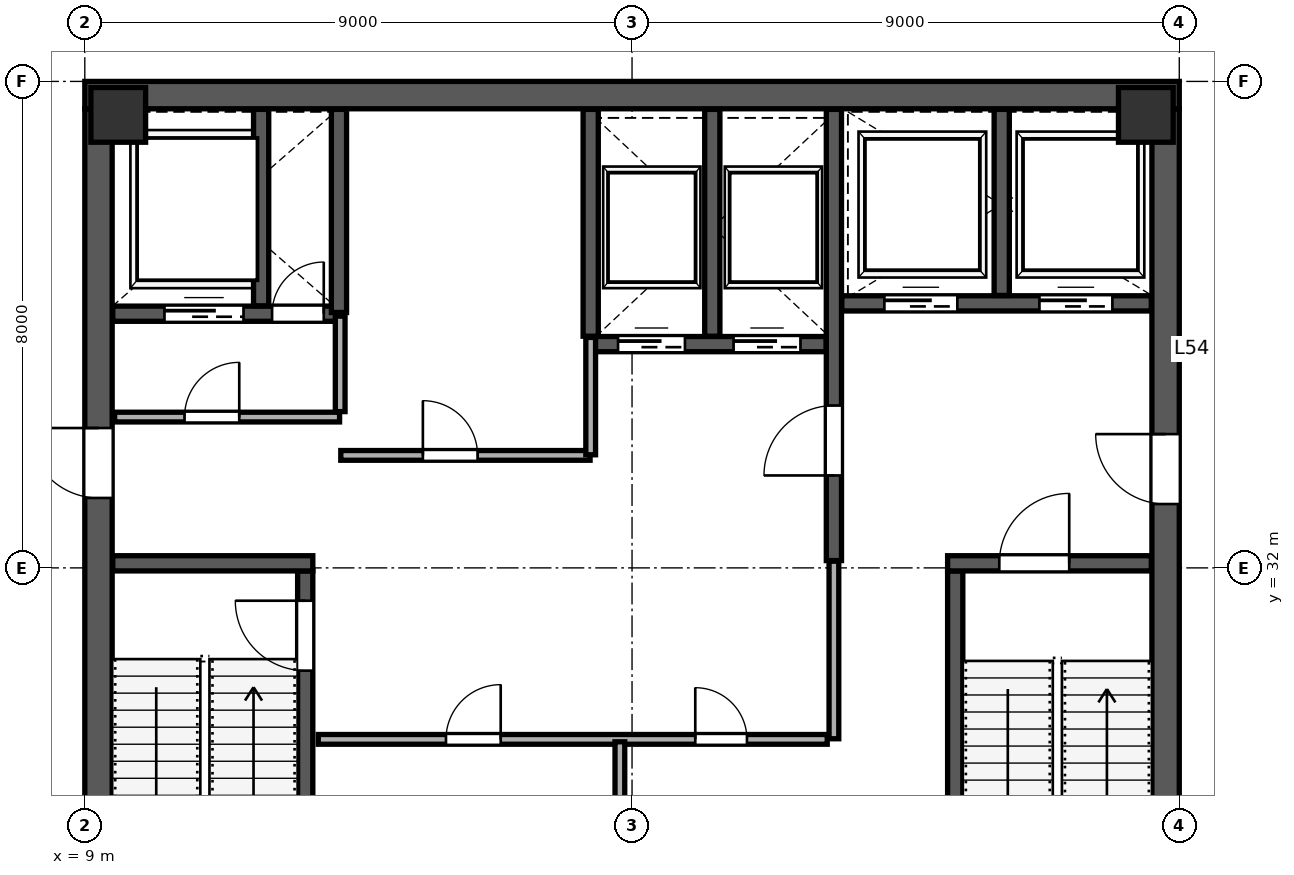
"""IFC4 building model, lengths in metres.
Left out: names, types, materials, properties, quantities, classifications, styles, units other than length and angle.
Written with IfcOpenShell. Run it as: python <this file> out.ifc"""

import sys

from ifc_helpers import new_model, si_unit, direction, frame, frame_2d, origin, origin_2d, place, context, subcontext, project, spatial, rectangle, extrude, source, transform, mapped, element, fill, save


model = new_model("IFC4")
c1 = context("Model", 3, precision=1e-05, world=origin(), true_north=direction((0.0, 1.0)))
c2 = subcontext(c1, "Body", "Model", "MODEL_VIEW")
j1 = project(units=[si_unit("LENGTHUNIT", "METRE"), si_unit("PLANEANGLEUNIT", "RADIAN")], contexts=[c1])
p1 = place(None, origin())
s1 = spatial("IfcSite", under=j1, at=p1, CompositionType="ELEMENT")
p2 = place(p1, origin())
s2 = spatial("IfcBuilding", under=s1, at=p2, CompositionType="ELEMENT")
p3 = place(p2, frame((0.0, 0.0, 241.6)))
s3 = spatial("IfcBuildingStorey", under=s2, at=p3, CompositionType="ELEMENT", Elevation=241.6)
m1 = source(origin(), c2, "Body", "SweptSolid", [
    extrude(rectangle(XDim=0.9, YDim=0.9, at=origin_2d()), origin(), (0.0, 0.0, 1.0), 4.198),
])
for number, where, z_axis, x_axis in (
    (1, (9.55, 39.45, 0.001), (0.0, 0.0, 1.0), (1.0, 0.0, 0.0)),
    (2, (26.45, 39.45, 0.001), (0.0, 0.0, 1.0), (1.0, 0.0, 0.0)),
):
    element("IfcColumn", number, at=place(p3, frame(where, z_axis=z_axis, x_axis=x_axis)), inside=s3, PredefinedType="COLUMN", context=c2, shape_type="MappedRepresentation", body=[
        mapped(m1, transform((0.0, 0.0, 0.0), scale=1.0)),
    ])
p4 = place(p3, frame((9.225, 24.45, 0.0), z_axis=(0.0, 0.0, 1.0), x_axis=(0.0, 1.0, 0.0)))
e3 = element("IfcWall", 3, at=p4, inside=s3, PredefinedType="SHEAR", context=c2, shape_type="SweptSolid", body=[
    extrude(rectangle(XDim=15.1, YDim=0.45, at=frame_2d((7.55, 0.0))), origin(), (0.0, 0.0, 1.0), 3.96),
])
p5 = place(p4, frame((8.7, 0.0, 0.0)))
e4 = element("IfcOpeningElement", 4, at=p5, cuts=e3, PredefinedType="OPENING", context=c2, shape_type="SweptSolid", body=[
    extrude(rectangle(XDim=1.15, YDim=2.2, at=frame_2d((0.575, 1.1))), frame((0.0, 0.235, 0.0), z_axis=(0.0, -1.0, 0.0), x_axis=(1.0, 0.0, 0.0)), (0.0, 0.0, 1.0), 0.47),
])
p6 = place(p3, frame((26.775, 24.45, 0.0), z_axis=(0.0, 0.0, 1.0), x_axis=(0.0, 1.0, 0.0)))
e5 = element("IfcWall", 5, at=p6, inside=s3, PredefinedType="SHEAR", context=c2, shape_type="SweptSolid", body=[
    extrude(rectangle(XDim=15.1, YDim=0.45, at=frame_2d((7.55, 0.0))), origin(), (0.0, 0.0, 1.0), 3.96),
])
p7 = place(p6, frame((8.6, 0.0, 0.0)))
e6 = element("IfcOpeningElement", 6, at=p7, cuts=e5, PredefinedType="OPENING", context=c2, shape_type="SweptSolid", body=[
    extrude(rectangle(XDim=1.15, YDim=2.2, at=frame_2d((0.575, 1.1))), frame((0.0, 0.235, 0.0), z_axis=(0.0, -1.0, 0.0), x_axis=(1.0, 0.0, 0.0)), (0.0, 0.0, 1.0), 0.47),
])
p8 = place(p3, frame((9.0, 39.775, 0.0), z_axis=(0.0, 0.0, 1.0), x_axis=(1.0, 0.0, 0.0)))
e7 = element("IfcWall", 7, at=p8, inside=s3, PredefinedType="SHEAR", context=c2, shape_type="SweptSolid", body=[
    extrude(rectangle(XDim=18.0, YDim=0.45, at=frame_2d((9.0, 0.0))), origin(), (0.0, 0.0, 1.0), 3.96),
])
p9 = place(p3, frame((12.625, 24.46, 0.0), z_axis=(0.0, 0.0, 1.0), x_axis=(0.0, 1.0, 0.0)))
e8 = element("IfcWall", 8, at=p9, inside=s3, PredefinedType="SHEAR", context=c2, shape_type="SweptSolid", body=[
    extrude(rectangle(XDim=7.49, YDim=0.25, at=frame_2d((3.745, 0.0))), origin(), (0.0, 0.0, 1.0), 3.96),
])
p10 = place(p9, frame((5.85, 0.0, 0.0)))
e9 = element("IfcOpeningElement", 9, at=p10, cuts=e8, PredefinedType="OPENING", context=c2, shape_type="SweptSolid", body=[
    extrude(rectangle(XDim=1.15, YDim=2.2, at=frame_2d((0.575, 1.1))), frame((0.0, 0.135, 0.0), z_axis=(0.0, -1.0, 0.0), x_axis=(1.0, 0.0, 0.0)), (0.0, 0.0, 1.0), 0.27),
])
p11 = place(p3, frame((9.46, 32.075, 0.0), z_axis=(0.0, 0.0, 1.0), x_axis=(1.0, 0.0, 0.0)))
e10 = element("IfcWall", 10, at=p11, inside=s3, PredefinedType="SHEAR", context=c2, shape_type="SweptSolid", body=[
    extrude(rectangle(XDim=3.29, YDim=0.25, at=frame_2d((1.645, 0.0))), origin(), (0.0, 0.0, 1.0), 3.96),
])
p12 = place(p3, frame((23.315, 24.46, 0.0), z_axis=(0.0, 0.0, 1.0), x_axis=(0.0, 1.0, 0.0)))
e11 = element("IfcWall", 11, at=p12, inside=s3, PredefinedType="SHEAR", context=c2, shape_type="SweptSolid", body=[
    extrude(rectangle(XDim=7.49, YDim=0.25, at=frame_2d((3.745, 0.0))), origin(), (0.0, 0.0, 1.0), 3.96),
])
p13 = place(p3, frame((23.19, 32.075, 0.0), z_axis=(0.0, 0.0, 1.0), x_axis=(1.0, 0.0, 0.0)))
e12 = element("IfcWall", 12, at=p13, inside=s3, PredefinedType="SHEAR", context=c2, shape_type="SweptSolid", body=[
    extrude(rectangle(XDim=3.35, YDim=0.25, at=frame_2d((1.675, 0.0))), origin(), (0.0, 0.0, 1.0), 3.96),
])
p14 = place(p13, frame((0.85, 0.0, 0.0)))
e13 = element("IfcOpeningElement", 13, at=p14, cuts=e12, PredefinedType="OPENING", context=c2, shape_type="SweptSolid", body=[
    extrude(rectangle(XDim=1.15, YDim=2.2, at=frame_2d((0.575, 1.1))), frame((0.0, 0.135, 0.0), z_axis=(0.0, -1.0, 0.0), x_axis=(1.0, 0.0, 0.0)), (0.0, 0.0, 1.0), 0.27),
])
p15 = place(p3, frame((21.32, 32.12, 0.0), z_axis=(0.0, 0.0, 1.0), x_axis=(0.0, 1.0, 0.0)))
e14 = element("IfcWall", 14, at=p15, inside=s3, PredefinedType="SHEAR", context=c2, shape_type="SweptSolid", body=[
    extrude(rectangle(XDim=7.42, YDim=0.25, at=frame_2d((3.71, 0.0))), origin(), (0.0, 0.0, 1.0), 3.96),
])
p16 = place(p15, frame((1.4, 0.0, 0.0)))
e15 = element("IfcOpeningElement", 15, at=p16, cuts=e14, PredefinedType="OPENING", context=c2, shape_type="SweptSolid", body=[
    extrude(rectangle(XDim=1.15, YDim=2.2, at=frame_2d((0.575, 1.1))), frame((0.0, 0.135, 0.0), z_axis=(0.0, -1.0, 0.0), x_axis=(1.0, 0.0, 0.0)), (0.0, 0.0, 1.0), 0.27),
])
p17 = place(p3, frame((9.46, 36.18, 0.0), z_axis=(0.0, 0.0, 1.0), x_axis=(1.0, 0.0, 0.0)))
e16 = element("IfcWall", 16, at=p17, inside=s3, PredefinedType="SHEAR", context=c2, shape_type="SweptSolid", body=[
    extrude(rectangle(XDim=3.79, YDim=0.25, at=frame_2d((1.895, 0.0))), origin(), (0.0, 0.0, 1.0), 3.96),
])
p18 = place(p17, frame((2.62, 0.0, 0.0)))
e17 = element("IfcOpeningElement", 17, at=p18, cuts=e16, PredefinedType="OPENING", context=c2, shape_type="SweptSolid", body=[
    extrude(rectangle(XDim=0.85, YDim=2.1, at=frame_2d((0.425, 1.05))), frame((0.0, 0.135, 0.0), z_axis=(0.0, -1.0, 0.0), x_axis=(1.0, 0.0, 0.0)), (0.0, 0.0, 1.0), 0.27),
])
p19 = place(p17, frame((0.85, 0.0, 0.0)))
e18 = element("IfcOpeningElement", 18, at=p19, cuts=e16, PredefinedType="OPENING", context=c2, shape_type="SweptSolid", body=[
    extrude(rectangle(XDim=1.3, YDim=2.25, at=frame_2d((0.65, 1.125))), frame((0.0, 0.135, 0.0), z_axis=(0.0, -1.0, 0.0), x_axis=(1.0, 0.0, 0.0)), (0.0, 0.0, 1.0), 0.27),
])
p20 = place(p3, frame((11.9, 36.31, 0.0), z_axis=(0.0, 0.0, 1.0), x_axis=(0.0, 1.0, 0.0)))
e19 = element("IfcWall", 19, at=p20, inside=s3, PredefinedType="SHEAR", context=c2, shape_type="SweptSolid", body=[
    extrude(rectangle(XDim=3.23, YDim=0.25, at=frame_2d((1.615, 0.0))), origin(), (0.0, 0.0, 1.0), 3.96),
])
p21 = place(p3, frame((21.45, 36.35, 0.0), z_axis=(0.0, 0.0, 1.0), x_axis=(1.0, 0.0, 0.0)))
e20 = element("IfcWall", 20, at=p21, inside=s3, PredefinedType="SHEAR", context=c2, shape_type="SweptSolid", body=[
    extrude(rectangle(XDim=5.09, YDim=0.25, at=frame_2d((2.545, 0.0))), origin(), (0.0, 0.0, 1.0), 3.96),
])
p22 = place(p21, frame((0.7, 0.0, 0.0)))
e21 = element("IfcOpeningElement", 21, at=p22, cuts=e20, PredefinedType="OPENING", context=c2, shape_type="SweptSolid", body=[
    extrude(rectangle(XDim=1.2, YDim=2.2, at=frame_2d((0.6, 1.1))), frame((0.0, 0.135, 0.0), z_axis=(0.0, -1.0, 0.0), x_axis=(1.0, 0.0, 0.0)), (0.0, 0.0, 1.0), 0.27),
])
p23 = place(p21, frame((3.25, 0.0, 0.0)))
e22 = element("IfcOpeningElement", 22, at=p23, cuts=e20, PredefinedType="OPENING", context=c2, shape_type="SweptSolid", body=[
    extrude(rectangle(XDim=1.2, YDim=2.2, at=frame_2d((0.6, 1.1))), frame((0.0, 0.135, 0.0), z_axis=(0.0, -1.0, 0.0), x_axis=(1.0, 0.0, 0.0)), (0.0, 0.0, 1.0), 0.27),
])
p24 = place(p3, frame((24.08, 36.48, 0.0), z_axis=(0.0, 0.0, 1.0), x_axis=(0.0, 1.0, 0.0)))
e23 = element("IfcWall", 23, at=p24, inside=s3, PredefinedType="SHEAR", context=c2, shape_type="SweptSolid", body=[
    extrude(rectangle(XDim=3.06, YDim=0.25, at=frame_2d((1.53, 0.0))), origin(), (0.0, 0.0, 1.0), 3.96),
])
p25 = place(p3, frame((13.18, 36.2, 0.0), z_axis=(0.0, 0.0, 1.0), x_axis=(0.0, 1.0, 0.0)))
e24 = element("IfcWall", 24, at=p25, inside=s3, PredefinedType="SHEAR", context=c2, shape_type="SweptSolid", body=[
    extrude(rectangle(XDim=3.34, YDim=0.25, at=frame_2d((1.67, 0.0))), origin(), (0.0, 0.0, 1.0), 3.96),
])
p26 = place(p3, frame((17.32, 35.68, 0.0), z_axis=(0.0, 0.0, 1.0), x_axis=(1.0, 0.0, 0.0)))
e25 = element("IfcWall", 25, at=p26, inside=s3, PredefinedType="SHEAR", context=c2, shape_type="SweptSolid", body=[
    extrude(rectangle(XDim=3.87, YDim=0.25, at=frame_2d((1.935, 0.0))), origin(), (0.0, 0.0, 1.0), 3.96),
])
p27 = place(p26, frame((0.45, 0.0, 0.0)))
e26 = element("IfcOpeningElement", 26, at=p27, cuts=e25, PredefinedType="OPENING", context=c2, shape_type="SweptSolid", body=[
    extrude(rectangle(XDim=1.1, YDim=2.2, at=frame_2d((0.55, 1.1))), frame((0.0, 0.135, 0.0), z_axis=(0.0, -1.0, 0.0), x_axis=(1.0, 0.0, 0.0)), (0.0, 0.0, 1.0), 0.27),
])
p28 = place(p26, frame((2.35, 0.0, 0.0)))
e27 = element("IfcOpeningElement", 27, at=p28, cuts=e25, PredefinedType="OPENING", context=c2, shape_type="SweptSolid", body=[
    extrude(rectangle(XDim=1.1, YDim=2.2, at=frame_2d((0.55, 1.1))), frame((0.0, 0.135, 0.0), z_axis=(0.0, -1.0, 0.0), x_axis=(1.0, 0.0, 0.0)), (0.0, 0.0, 1.0), 0.27),
])
for number, where, z_axis, x_axis in (
    (28, (17.32, 35.81, 0.0), (0.0, 0.0, 1.0), (0.0, 1.0, 0.0)),
    (29, (19.32, 35.81, 0.0), (0.0, 0.0, 1.0), (0.0, 1.0, 0.0)),
):
    element("IfcWall", number, at=place(p3, frame(where, z_axis=z_axis, x_axis=x_axis)), inside=s3, PredefinedType="SHEAR", context=c2, shape_type="SweptSolid", body=[
        extrude(rectangle(XDim=3.73, YDim=0.25, at=frame_2d((1.865, 0.0))), origin(), (0.0, 0.0, 1.0), 3.96),
    ])
p29 = place(p3, frame((9.49, 34.48, 0.0), z_axis=(0.0, 0.0, 1.0), x_axis=(1.0, 0.0, 0.0)))
e30 = element("IfcWall", 30, at=p29, inside=s3, PredefinedType="PARTITIONING", context=c2, shape_type="SweptSolid", body=[
    extrude(rectangle(XDim=3.7, YDim=0.16, at=frame_2d((1.85, 0.0))), origin(), (0.0, 0.0, 1.0), 3.96),
])
p30 = place(p29, frame((1.15, 0.0, 0.0)))
e31 = element("IfcOpeningElement", 31, at=p30, cuts=e30, PredefinedType="OPENING", context=c2, shape_type="SweptSolid", body=[
    extrude(rectangle(XDim=0.9, YDim=2.15, at=frame_2d((0.45, 1.075))), frame((0.0, 0.09, 0.0), z_axis=(0.0, -1.0, 0.0), x_axis=(1.0, 0.0, 0.0)), (0.0, 0.0, 1.0), 0.18),
])
p31 = place(p3, frame((13.2, 34.57, 0.0), z_axis=(0.0, 0.0, 1.0), x_axis=(0.0, 1.0, 0.0)))
e32 = element("IfcWall", 32, at=p31, inside=s3, PredefinedType="PARTITIONING", context=c2, shape_type="SweptSolid", body=[
    extrude(rectangle(XDim=1.57, YDim=0.16, at=frame_2d((0.785, 0.0))), origin(), (0.0, 0.0, 1.0), 3.96),
])
p32 = place(p3, frame((13.21, 33.85, 0.0), z_axis=(0.0, 0.0, 1.0), x_axis=(1.0, 0.0, 0.0)))
e33 = element("IfcWall", 33, at=p32, inside=s3, PredefinedType="PARTITIONING", context=c2, shape_type="SweptSolid", body=[
    extrude(rectangle(XDim=4.1, YDim=0.16, at=frame_2d((2.05, 0.0))), origin(), (0.0, 0.0, 1.0), 3.96),
])
p33 = place(p32, frame((1.35, 0.0, 0.0)))
e34 = element("IfcOpeningElement", 34, at=p33, cuts=e33, PredefinedType="OPENING", context=c2, shape_type="SweptSolid", body=[
    extrude(rectangle(XDim=0.9, YDim=2.15, at=frame_2d((0.45, 1.075))), frame((0.0, 0.09, 0.0), z_axis=(0.0, -1.0, 0.0), x_axis=(1.0, 0.0, 0.0)), (0.0, 0.0, 1.0), 0.18),
])
p34 = place(p3, frame((17.32, 33.86, 0.0), z_axis=(0.0, 0.0, 1.0), x_axis=(0.0, 1.0, 0.0)))
e35 = element("IfcWall", 35, at=p34, inside=s3, PredefinedType="PARTITIONING", context=c2, shape_type="SweptSolid", body=[
    extrude(rectangle(XDim=1.93, YDim=0.16, at=frame_2d((0.965, 0.0))), origin(), (0.0, 0.0, 1.0), 3.96),
])
p35 = place(p3, frame((12.84, 29.18, 0.0), z_axis=(0.0, 0.0, 1.0), x_axis=(1.0, 0.0, 0.0)))
e36 = element("IfcWall", 36, at=p35, inside=s3, PredefinedType="PARTITIONING", context=c2, shape_type="SweptSolid", body=[
    extrude(rectangle(XDim=8.37, YDim=0.16, at=frame_2d((4.185, 0.0))), origin(), (0.0, 0.0, 1.0), 3.96),
])
p36 = place(p35, frame((2.1, 0.0, 0.0)))
e37 = element("IfcOpeningElement", 37, at=p36, cuts=e36, PredefinedType="OPENING", context=c2, shape_type="SweptSolid", body=[
    extrude(rectangle(XDim=0.9, YDim=2.15, at=frame_2d((0.45, 1.075))), frame((0.0, 0.09, 0.0), z_axis=(0.0, -1.0, 0.0), x_axis=(1.0, 0.0, 0.0)), (0.0, 0.0, 1.0), 0.18),
])
p37 = place(p35, frame((6.2, 0.0, 0.0)))
e38 = element("IfcOpeningElement", 38, at=p37, cuts=e36, PredefinedType="OPENING", context=c2, shape_type="SweptSolid", body=[
    extrude(rectangle(XDim=0.85, YDim=2.1, at=frame_2d((0.425, 1.05))), frame((0.0, 0.09, 0.0), z_axis=(0.0, -1.0, 0.0), x_axis=(1.0, 0.0, 0.0)), (0.0, 0.0, 1.0), 0.18),
])
p38 = place(p3, frame((17.8, 24.54, 0.0), z_axis=(0.0, 0.0, 1.0), x_axis=(0.0, 1.0, 0.0)))
e39 = element("IfcWall", 39, at=p38, inside=s3, PredefinedType="PARTITIONING", context=c2, shape_type="SweptSolid", body=[
    extrude(rectangle(XDim=4.6, YDim=0.16, at=frame_2d((2.3, 0.0))), origin(), (0.0, 0.0, 1.0), 3.96),
])
p39 = place(p3, frame((21.32, 29.19, 0.0), z_axis=(0.0, 0.0, 1.0), x_axis=(0.0, 1.0, 0.0)))
e40 = element("IfcWall", 40, at=p39, inside=s3, PredefinedType="PARTITIONING", context=c2, shape_type="SweptSolid", body=[
    extrude(rectangle(XDim=2.92, YDim=0.16, at=frame_2d((1.46, 0.0))), origin(), (0.0, 0.0, 1.0), 3.96),
])
p40 = place(p3, frame((17.993, 51.134, 0.0), z_axis=(0.0, 0.0, 1.0), x_axis=(0.707106781187, -0.707106781187, 0.0)))
e41 = element("IfcWall", 41, at=p40, inside=s3, PredefinedType="PARTITIONING", context=c2, shape_type="SweptSolid", body=[
    extrude(rectangle(XDim=22.27, YDim=0.1, at=frame_2d((11.135, 0.0))), origin(), (0.0, 0.0, 1.0), 3.96),
])
p41 = place(p40, frame((10.8, 0.0, 0.0)))
e42 = element("IfcOpeningElement", 42, at=p41, cuts=e41, PredefinedType="OPENING", context=c2, shape_type="SweptSolid", body=[
    extrude(rectangle(XDim=0.95, YDim=2.15, at=frame_2d((0.475, 1.075))), frame((0.0, 0.06, 0.0), z_axis=(0.0, -1.0, 0.0), x_axis=(1.0, 0.0, 0.0)), (0.0, 0.0, 1.0), 0.12),
])
p42 = place(p3, frame((0.775, 33.973, 0.0), z_axis=(0.0, 0.0, 1.0), x_axis=(0.707106781187, 0.707106781187, 0.0)))
e43 = element("IfcWall", 43, at=p42, inside=s3, PredefinedType="PARTITIONING", context=c2, shape_type="SweptSolid", body=[
    extrude(rectangle(XDim=29.28, YDim=0.115, at=frame_2d((14.64, 0.0))), origin(), (0.0, 0.0, 1.0), 3.96),
])
p43 = place(p42, frame((2.2, 0.0, 0.0)))
e44 = element("IfcOpeningElement", 44, at=p43, cuts=e43, PredefinedType="OPENING", context=c2, shape_type="SweptSolid", body=[
    extrude(rectangle(XDim=0.95, YDim=2.15, at=frame_2d((0.475, 1.075))), frame((0.0, 0.067, 0.0), z_axis=(0.0, -1.0, 0.0), x_axis=(1.0, 0.0, 0.0)), (0.0, 0.0, 1.0), 0.135),
])
m2 = source(origin(), c2, "Body", "SweptSolid", [
    extrude(rectangle(XDim=1.15, YDim=2.2, at=frame_2d((0.575, 1.1))), frame((0.0, 0.025, 0.0), z_axis=(0.0, -1.0, 0.0), x_axis=(1.0, 0.0, 0.0)), (0.0, 0.0, 1.0), 0.05),
])
p44 = place(p10, origin())
e45 = element("IfcDoor", 45, at=p44, inside=s3, OperationType="SINGLE_SWING_RIGHT", PredefinedType="DOOR", context=c2, shape_type="MappedRepresentation", body=[
    mapped(m2, transform((0.0, 0.0, 0.0), scale=1.0)),
])
fill(e9, e45)
m3 = source(origin(), c2, "Body", "SweptSolid", [
    extrude(rectangle(XDim=1.15, YDim=2.2, at=frame_2d((0.575, 1.1))), frame((0.0, 0.025, 0.0), z_axis=(0.0, -1.0, 0.0), x_axis=(1.0, 0.0, 0.0)), (0.0, 0.0, 1.0), 0.05),
])
p45 = place(p16, origin())
e46 = element("IfcDoor", 46, at=p45, inside=s3, OperationType="SINGLE_SWING_LEFT", PredefinedType="DOOR", context=c2, shape_type="MappedRepresentation", body=[
    mapped(m3, transform((0.0, 0.0, 0.0), scale=1.0)),
])
fill(e15, e46)
p46 = place(p14, origin())
e47 = element("IfcDoor", 47, at=p46, inside=s3, OperationType="SINGLE_SWING_RIGHT", PredefinedType="DOOR", context=c2, shape_type="MappedRepresentation", body=[
    mapped(m2, transform((0.0, 0.0, 0.0), scale=1.0)),
])
fill(e13, e47)
p47 = place(p7, origin())
e48 = element("IfcDoor", 48, at=p47, inside=s3, OperationType="SINGLE_SWING_RIGHT", PredefinedType="DOOR", context=c2, shape_type="MappedRepresentation", body=[
    mapped(m3, transform((0.0, 0.0, 0.0), scale=1.0)),
])
fill(e6, e48)
p48 = place(p5, origin())
e49 = element("IfcDoor", 49, at=p48, inside=s3, OperationType="SINGLE_SWING_RIGHT", PredefinedType="DOOR", context=c2, shape_type="MappedRepresentation", body=[
    mapped(m3, transform((0.0, 0.0, 0.0), scale=1.0)),
])
fill(e4, e49)
m4 = source(origin(), c2, "Body", "SweptSolid", [
    extrude(rectangle(XDim=0.85, YDim=2.1, at=frame_2d((0.425, 1.05))), frame((0.0, 0.025, 0.0), z_axis=(0.0, -1.0, 0.0), x_axis=(1.0, 0.0, 0.0)), (0.0, 0.0, 1.0), 0.05),
])
p49 = place(p18, origin())
e50 = element("IfcDoor", 50, at=p49, inside=s3, OperationType="SINGLE_SWING_RIGHT", PredefinedType="DOOR", context=c2, shape_type="MappedRepresentation", body=[
    mapped(m4, transform((0.0, 0.0, 0.0), scale=1.0)),
])
fill(e17, e50)
m5 = source(origin(), c2, "Body", "SweptSolid", [
    extrude(rectangle(XDim=1.1, YDim=2.2, at=frame_2d((0.55, 1.1))), frame((0.0, 0.025, 0.0), z_axis=(0.0, -1.0, 0.0), x_axis=(1.0, 0.0, 0.0)), (0.0, 0.0, 1.0), 0.05),
])
p50 = place(p27, origin())
e51 = element("IfcDoor", 51, at=p50, inside=s3, OperationType="SLIDING_TO_LEFT", PredefinedType="DOOR", context=c2, shape_type="MappedRepresentation", body=[
    mapped(m5, transform((0.0, 0.0, 0.0), scale=1.0)),
])
fill(e26, e51)
p51 = place(p28, origin())
e52 = element("IfcDoor", 52, at=p51, inside=s3, OperationType="SLIDING_TO_RIGHT", PredefinedType="DOOR", context=c2, shape_type="MappedRepresentation", body=[
    mapped(m5, transform((0.0, 0.0, 0.0), scale=1.0)),
])
fill(e27, e52)
m6 = source(origin(), c2, "Body", "SweptSolid", [
    extrude(rectangle(XDim=1.2, YDim=2.2, at=frame_2d((0.6, 1.1))), frame((0.0, 0.025, 0.0), z_axis=(0.0, -1.0, 0.0), x_axis=(1.0, 0.0, 0.0)), (0.0, 0.0, 1.0), 0.05),
])
p52 = place(p22, origin())
e53 = element("IfcDoor", 53, at=p52, inside=s3, OperationType="SLIDING_TO_LEFT", PredefinedType="DOOR", context=c2, shape_type="MappedRepresentation", body=[
    mapped(m6, transform((0.0, 0.0, 0.0), scale=1.0)),
])
fill(e21, e53)
p53 = place(p23, origin())
e54 = element("IfcDoor", 54, at=p53, inside=s3, OperationType="SLIDING_TO_RIGHT", PredefinedType="DOOR", context=c2, shape_type="MappedRepresentation", body=[
    mapped(m6, transform((0.0, 0.0, 0.0), scale=1.0)),
])
fill(e22, e54)
m7 = source(origin(), c2, "Body", "SweptSolid", [
    extrude(rectangle(XDim=1.3, YDim=2.25, at=frame_2d((0.65, 1.125))), frame((0.0, 0.025, 0.0), z_axis=(0.0, -1.0, 0.0), x_axis=(1.0, 0.0, 0.0)), (0.0, 0.0, 1.0), 0.05),
])
p54 = place(p19, origin())
e55 = element("IfcDoor", 55, at=p54, inside=s3, OperationType="SLIDING_TO_LEFT", PredefinedType="DOOR", context=c2, shape_type="MappedRepresentation", body=[
    mapped(m7, transform((0.0, 0.0, 0.0), scale=1.0)),
])
fill(e18, e55)
m8 = source(origin(), c2, "Body", "SweptSolid", [
    extrude(rectangle(XDim=0.9, YDim=2.15, at=frame_2d((0.45, 1.075))), frame((0.0, 0.025, 0.0), z_axis=(0.0, -1.0, 0.0), x_axis=(1.0, 0.0, 0.0)), (0.0, 0.0, 1.0), 0.05),
])
p55 = place(p30, origin())
e56 = element("IfcDoor", 56, at=p55, inside=s3, OperationType="SINGLE_SWING_RIGHT", PredefinedType="DOOR", context=c2, shape_type="MappedRepresentation", body=[
    mapped(m8, transform((0.0, 0.0, 0.0), scale=1.0)),
])
fill(e31, e56)
p56 = place(p33, origin())
e57 = element("IfcDoor", 57, at=p56, inside=s3, OperationType="SINGLE_SWING_LEFT", PredefinedType="DOOR", context=c2, shape_type="MappedRepresentation", body=[
    mapped(m8, transform((0.0, 0.0, 0.0), scale=1.0)),
])
fill(e34, e57)
p57 = place(p36, origin())
e58 = element("IfcDoor", 58, at=p57, inside=s3, OperationType="SINGLE_SWING_RIGHT", PredefinedType="DOOR", context=c2, shape_type="MappedRepresentation", body=[
    mapped(m8, transform((0.0, 0.0, 0.0), scale=1.0)),
])
fill(e37, e58)
p58 = place(p37, origin())
e59 = element("IfcDoor", 59, at=p58, inside=s3, OperationType="SINGLE_SWING_LEFT", PredefinedType="DOOR", context=c2, shape_type="MappedRepresentation", body=[
    mapped(m4, transform((0.0, 0.0, 0.0), scale=1.0)),
])
fill(e38, e59)
save(model, sys.argv[1])
